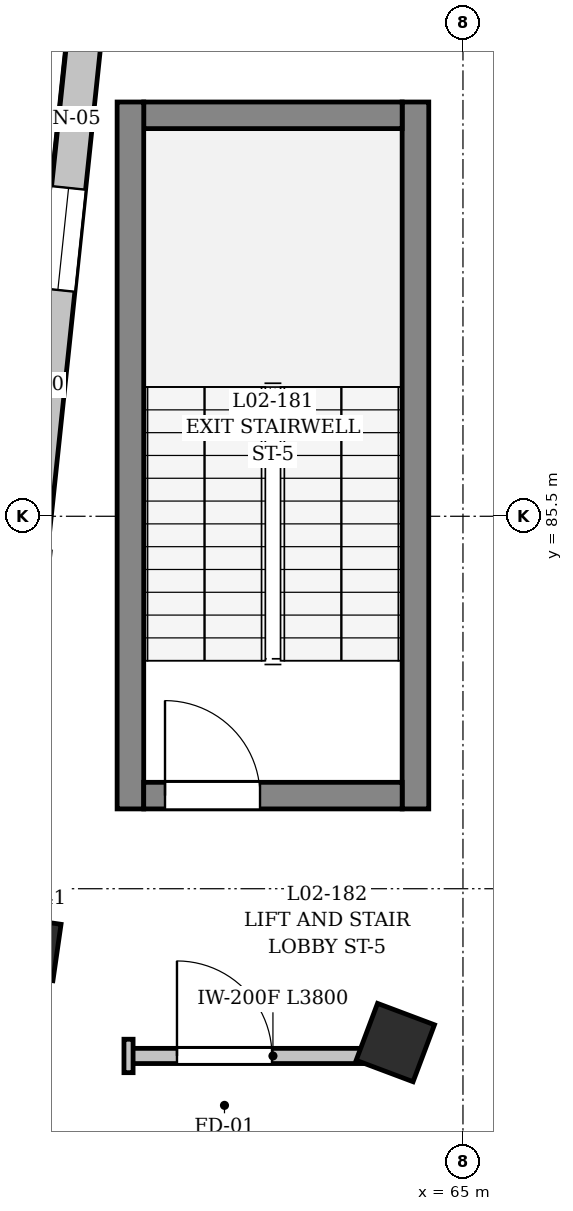
"""IFC4 building model, lengths in metres.
Left out: names, types, materials, properties, quantities, classifications, styles, units other than length and angle.
Written with IfcOpenShell. Run it as: python <this file> out.ifc"""

import sys

from ifc_helpers import new_model, si_unit, direction, frame, frame_2d, origin, origin_2d, place, context, subcontext, project, spatial, rectangle, extrude, element, fill, save


model = new_model("IFC4")
c1 = context("Model", 3, precision=1e-05, world=origin(), true_north=direction((0.0, 1.0)))
c2 = subcontext(c1, "Body", "Model", "MODEL_VIEW")
j1 = project(units=[si_unit("LENGTHUNIT", "METRE"), si_unit("PLANEANGLEUNIT", "RADIAN")], contexts=[c1])
p1 = place(None, origin())
s1 = spatial("IfcSite", under=j1, at=p1, CompositionType="ELEMENT")
p2 = place(p1, origin())
s2 = spatial("IfcBuilding", under=s1, at=p2, CompositionType="ELEMENT")
p3 = place(p2, frame((0.0, 0.0, 5.4)))
s3 = spatial("IfcBuildingStorey", under=s2, at=p3, CompositionType="ELEMENT", Elevation=5.4)
p4 = place(p3, frame((64.11, 78.576, 0.0), z_axis=(0.0, 0.0, 1.0), x_axis=(0.351841648405, 0.936059535739, 0.0)))
e1 = element("IfcColumn", 1, at=p4, inside=s3, PredefinedType="COLUMN", context=c2, shape_type="SweptSolid", body=[
    extrude(rectangle(XDim=0.8, YDim=0.8, at=origin_2d()), origin(), (0.0, 0.0, 1.0), 4.5),
])
p5 = place(p3, frame((59.288, 79.814, 0.0), z_axis=(0.0, 0.0, 1.0), x_axis=(0.142628933706, 0.989776230908, 0.0)))
e2 = element("IfcColumn", 2, at=p5, inside=s3, PredefinedType="COLUMN", context=c2, shape_type="SweptSolid", body=[
    extrude(rectangle(XDim=0.75, YDim=0.75, at=origin_2d()), origin(), (0.0, 0.0, 1.0), 4.5),
])
p6 = place(p3, frame((59.429, 94.029, 0.0), z_axis=(0.0, 0.0, 1.0), x_axis=(-0.104538111567, -0.994520881244, 0.0)))
e3 = element("IfcWall", 3, at=p6, inside=s3, PredefinedType="SOLIDWALL", context=c2, shape_type="SweptSolid", body=[
    extrude(rectangle(XDim=13.69, YDim=0.5, at=frame_2d((6.845, 0.0))), origin(), (0.0, 0.0, 1.0), 3.39),
])
p7 = place(p6, frame((2.345, 0.0, 0.9)))
e4 = element("IfcOpeningElement", 4, at=p7, cuts=e3, PredefinedType="OPENING", context=c2, shape_type="SweptSolid", body=[
    extrude(rectangle(XDim=1.8, YDim=2.1, at=frame_2d((0.9, 1.05))), frame((0.0, 0.26, 0.0), z_axis=(0.0, -1.0, 0.0), x_axis=(1.0, 0.0, 0.0)), (0.0, 0.0, 1.0), 0.52),
])
p8 = place(p6, frame((5.945, 0.0, 0.9)))
e5 = element("IfcOpeningElement", 5, at=p8, cuts=e3, PredefinedType="OPENING", context=c2, shape_type="SweptSolid", body=[
    extrude(rectangle(XDim=1.8, YDim=2.1, at=frame_2d((0.9, 1.05))), frame((0.0, 0.26, 0.0), z_axis=(0.0, -1.0, 0.0), x_axis=(1.0, 0.0, 0.0)), (0.0, 0.0, 1.0), 0.52),
])
p9 = place(p6, frame((9.545, 0.0, 0.9)))
e6 = element("IfcOpeningElement", 6, at=p9, cuts=e3, PredefinedType="OPENING", context=c2, shape_type="SweptSolid", body=[
    extrude(rectangle(XDim=1.8, YDim=2.1, at=frame_2d((0.9, 1.05))), frame((0.0, 0.26, 0.0), z_axis=(0.0, -1.0, 0.0), x_axis=(1.0, 0.0, 0.0)), (0.0, 0.0, 1.0), 0.52),
])
p10 = place(p3, frame((59.311, 85.06, 0.0), z_axis=(0.0, 0.0, 1.0), x_axis=(0.104529993567, 0.994521734526, 0.0)))
e7 = element("IfcWall", 7, at=p10, inside=s3, PredefinedType="SOLIDWALL", context=c2, shape_type="SweptSolid", body=[
    extrude(rectangle(XDim=11.823, YDim=0.45, at=frame_2d((5.911, 0.0))), origin(), (0.0, 0.0, 1.0), 4.5),
])
p11 = place(p10, frame((3.436, 0.0, 0.9)))
e8 = element("IfcOpeningElement", 8, at=p11, cuts=e7, PredefinedType="OPENING", context=c2, shape_type="SweptSolid", body=[
    extrude(rectangle(XDim=1.35, YDim=1.8, at=frame_2d((0.675, 0.9))), frame((0.0, 0.235, 0.0), z_axis=(0.0, -1.0, 0.0), x_axis=(1.0, 0.0, 0.0)), (0.0, 0.0, 1.0), 0.47),
])
p12 = place(p10, frame((7.036, 0.0, 0.9)))
e9 = element("IfcOpeningElement", 9, at=p12, cuts=e7, PredefinedType="OPENING", context=c2, shape_type="SweptSolid", body=[
    extrude(rectangle(XDim=1.35, YDim=1.8, at=frame_2d((0.675, 0.9))), frame((0.0, 0.235, 0.0), z_axis=(0.0, -1.0, 0.0), x_axis=(1.0, 0.0, 0.0)), (0.0, 0.0, 1.0), 0.47),
])
p13 = place(p3, frame((64.375, 81.65, 0.0), z_axis=(0.0, 0.0, 1.0), x_axis=(0.0, 1.0, 0.0)))
e10 = element("IfcWall", 10, at=p13, inside=s3, PredefinedType="SHEAR", context=c2, shape_type="SweptSolid", body=[
    extrude(rectangle(XDim=9.3, YDim=0.35, at=frame_2d((4.65, 0.0))), origin(), (0.0, 0.0, 1.0), 4.5),
])
p14 = place(p3, frame((64.2, 90.775, 0.0), z_axis=(0.0, 0.0, 1.0), x_axis=(-1.0, 0.0, 0.0)))
e11 = element("IfcWall", 11, at=p14, inside=s3, PredefinedType="SHEAR", context=c2, shape_type="SweptSolid", body=[
    extrude(rectangle(XDim=3.4, YDim=0.35, at=frame_2d((1.7, 0.0))), origin(), (0.0, 0.0, 1.0), 4.5),
])
p15 = place(p3, frame((60.625, 90.95, 0.0), z_axis=(0.0, 0.0, 1.0), x_axis=(0.0, -1.0, 0.0)))
e12 = element("IfcWall", 12, at=p15, inside=s3, PredefinedType="SHEAR", context=c2, shape_type="SweptSolid", body=[
    extrude(rectangle(XDim=9.3, YDim=0.35, at=frame_2d((4.65, 0.0))), origin(), (0.0, 0.0, 1.0), 4.5),
])
p16 = place(p3, frame((60.8, 81.825, 0.0), z_axis=(0.0, 0.0, 1.0), x_axis=(1.0, 0.0, 0.0)))
e13 = element("IfcWall", 13, at=p16, inside=s3, PredefinedType="SHEAR", context=c2, shape_type="SweptSolid", body=[
    extrude(rectangle(XDim=3.4, YDim=0.35, at=frame_2d((1.7, 0.0))), origin(), (0.0, 0.0, 1.0), 4.5),
])
p17 = place(p16, frame((0.28, 0.0, 0.0)))
e14 = element("IfcOpeningElement", 14, at=p17, cuts=e13, PredefinedType="OPENING", context=c2, shape_type="SweptSolid", body=[
    extrude(rectangle(XDim=1.25, YDim=2.2, at=frame_2d((0.625, 1.1))), frame((0.0, 0.185, 0.0), z_axis=(0.0, -1.0, 0.0), x_axis=(1.0, 0.0, 0.0)), (0.0, 0.0, 1.0), 0.37),
])
p18 = place(p3, frame((60.6, 78.4, 0.0), z_axis=(0.0, 0.0, 1.0), x_axis=(1.0, 0.0, 0.0)))
e15 = element("IfcWall", 15, at=p18, inside=s3, PredefinedType="PARTITIONING", context=c2, shape_type="SweptSolid", body=[
    extrude(rectangle(XDim=3.8, YDim=0.2, at=frame_2d((1.9, 0.0))), origin(), (0.0, 0.0, 1.0), 3.59),
])
p19 = place(p18, frame((0.637, 0.0, 0.0)))
e16 = element("IfcOpeningElement", 16, at=p19, cuts=e15, PredefinedType="OPENING", context=c2, shape_type="SweptSolid", body=[
    extrude(rectangle(XDim=1.25, YDim=2.2, at=frame_2d((0.625, 1.1))), frame((0.0, 0.11, 0.0), z_axis=(0.0, -1.0, 0.0), x_axis=(1.0, 0.0, 0.0)), (0.0, 0.0, 1.0), 0.22),
])
p20 = place(p3, frame((60.6, 78.18, 0.0), z_axis=(0.0, 0.0, 1.0), x_axis=(0.0, 1.0, 0.0)))
e17 = element("IfcWall", 17, at=p20, inside=s3, PredefinedType="PARTITIONING", context=c2, shape_type="SweptSolid", body=[
    extrude(rectangle(XDim=0.44, YDim=0.12, at=frame_2d((0.22, 0.0))), origin(), (0.0, 0.0, 1.0), 3.89),
])
p21 = place(p11, origin())
e18 = element("IfcWindow", 18, at=p21, inside=s3, PartitioningType="DOUBLE_PANEL_VERTICAL", PredefinedType="WINDOW", context=c2, shape_type="SweptSolid", body=[
    extrude(rectangle(XDim=1.35, YDim=1.8, at=frame_2d((0.675, 0.9))), frame((0.0, 0.03, 0.0), z_axis=(0.0, -1.0, 0.0), x_axis=(1.0, 0.0, 0.0)), (0.0, 0.0, 1.0), 0.06),
])
fill(e8, e18)
p22 = place(p17, origin())
e19 = element("IfcDoor", 19, at=p22, inside=s3, OperationType="SINGLE_SWING_LEFT", PredefinedType="DOOR", context=c2, shape_type="SweptSolid", body=[
    extrude(rectangle(XDim=1.25, YDim=2.2, at=frame_2d((0.625, 1.1))), frame((0.0, 0.025, 0.0), z_axis=(0.0, -1.0, 0.0), x_axis=(1.0, 0.0, 0.0)), (0.0, 0.0, 1.0), 0.05),
])
fill(e14, e19)
p23 = place(p19, origin())
e20 = element("IfcDoor", 20, at=p23, inside=s3, OperationType="SINGLE_SWING_LEFT", PredefinedType="DOOR", context=c2, shape_type="SweptSolid", body=[
    extrude(rectangle(XDim=1.25, YDim=2.2, at=frame_2d((0.625, 1.1))), frame((0.0, 0.025, 0.0), z_axis=(0.0, -1.0, 0.0), x_axis=(1.0, 0.0, 0.0)), (0.0, 0.0, 1.0), 0.05),
])
fill(e16, e20)
save(model, sys.argv[1])
